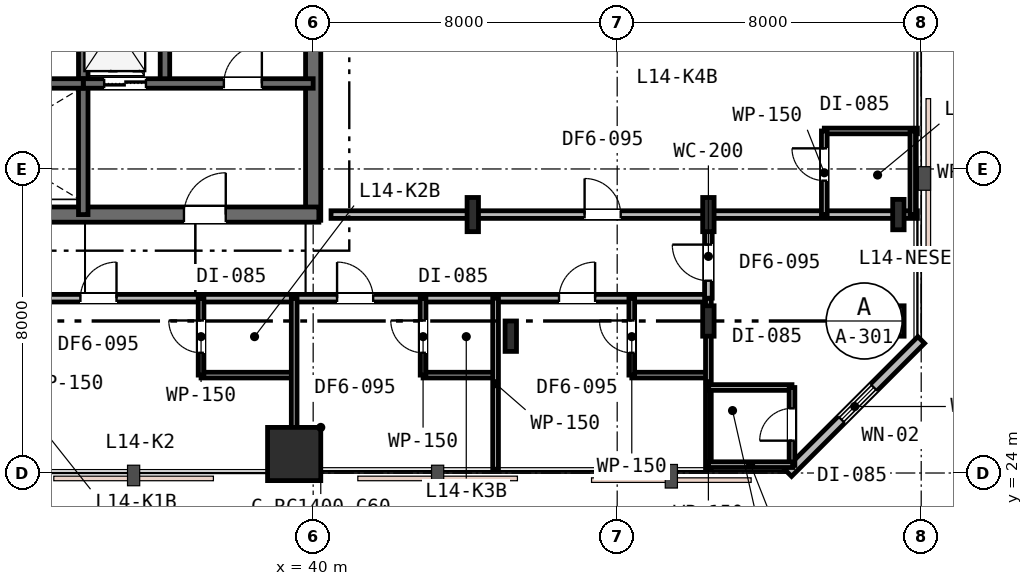
"""IFC4 building model, lengths in metres.
Left out: names, types, materials, properties, quantities, classifications, styles, units other than length and angle.
Written with IfcOpenShell. Run it as: python <this file> out.ifc"""

import sys

from ifc_helpers import new_model, si_unit, direction, frame, frame_2d, origin, origin_2d, place, context, subcontext, project, spatial, rectangle, i_section, extrude, element, fill, save


model = new_model("IFC4")
c1 = context("Model", 3, precision=1e-05, world=origin(), true_north=direction((0.0, 1.0)))
c2 = subcontext(c1, "Body", "Model", "MODEL_VIEW")
j1 = project(units=[si_unit("LENGTHUNIT", "METRE"), si_unit("PLANEANGLEUNIT", "RADIAN")], contexts=[c1])
p1 = place(None, origin())
s1 = spatial("IfcSite", under=j1, at=p1, CompositionType="ELEMENT")
p2 = place(p1, origin())
s2 = spatial("IfcBuilding", under=s1, at=p2, CompositionType="ELEMENT")
p3 = place(p2, frame((0.0, 0.0, 58.2)))
s3 = spatial("IfcBuildingStorey", under=s2, at=p3, CompositionType="ELEMENT", Elevation=58.2)
p4 = place(p3, frame((40.0, 30.65, 0.0), z_axis=(0.0, 0.0, 1.0), x_axis=(0.0, 1.0, 0.0)))
e1 = element("IfcWall", 1, at=p4, inside=s3, PredefinedType="SHEAR", context=c2, shape_type="SweptSolid", body=[
    extrude(rectangle(XDim=12.3, YDim=0.4, at=frame_2d((6.15, 0.0))), origin(), (0.0, 0.0, 1.0), 3.6),
])
p5 = place(p3, frame((28.95, 30.8, 0.0), z_axis=(0.0, 0.0, 1.0), x_axis=(1.0, 0.0, 0.0)))
e2 = element("IfcWall", 2, at=p5, inside=s3, PredefinedType="SHEAR", context=c2, shape_type="SweptSolid", body=[
    extrude(rectangle(XDim=11.2, YDim=0.4, at=frame_2d((5.6, 0.0))), origin(), (0.0, 0.0, 1.0), 3.6),
])
p6 = place(p5, frame((7.65, 0.0, 0.0)))
e3 = element("IfcOpeningElement", 3, at=p6, cuts=e2, PredefinedType="OPENING", context=c2, shape_type="SweptSolid", body=[
    extrude(rectangle(XDim=1.1, YDim=2.15, at=frame_2d((0.55, 1.075))), frame((0.0, 0.21, 0.0), z_axis=(0.0, -1.0, 0.0), x_axis=(1.0, 0.0, 0.0)), (0.0, 0.0, 1.0), 0.42),
])
p7 = place(p3, frame((36.1, 34.25, 0.0), z_axis=(0.0, 0.0, 1.0), x_axis=(0.0, 1.0, 0.0)))
e4 = element("IfcWall", 4, at=p7, inside=s3, PredefinedType="SHEAR", context=c2, shape_type="SweptSolid", body=[
    extrude(rectangle(XDim=8.65, YDim=0.25, at=frame_2d((4.325, 0.0))), origin(), (0.0, 0.0, 1.0), 3.6),
])
p8 = place(p3, frame((33.95, 30.8, 0.0), z_axis=(0.0, 0.0, 1.0), x_axis=(0.0, 1.0, 0.0)))
e5 = element("IfcWall", 5, at=p8, inside=s3, PredefinedType="SHEAR", context=c2, shape_type="SweptSolid", body=[
    extrude(rectangle(XDim=6.45, YDim=0.25, at=frame_2d((3.225, 0.0))), origin(), (0.0, 0.0, 1.0), 3.6),
])
p9 = place(p3, frame((33.95, 34.25, 0.0), z_axis=(0.0, 0.0, 1.0), x_axis=(1.0, 0.0, 0.0)))
e6 = element("IfcWall", 6, at=p9, inside=s3, PredefinedType="SHEAR", context=c2, shape_type="SweptSolid", body=[
    extrude(rectangle(XDim=6.05, YDim=0.25, at=frame_2d((3.025, 0.0))), origin(), (0.0, 0.0, 1.0), 3.6),
])
p10 = place(p9, frame((3.7, 0.0, 0.0)))
e7 = element("IfcOpeningElement", 7, at=p10, cuts=e6, PredefinedType="OPENING", context=c2, shape_type="SweptSolid", body=[
    extrude(rectangle(XDim=1.0, YDim=2.15, at=frame_2d((0.5, 1.075))), frame((0.0, 0.135, 0.0), z_axis=(0.0, -1.0, 0.0), x_axis=(1.0, 0.0, 0.0)), (0.0, 0.0, 1.0), 0.27),
])
p11 = place(p9, frame((0.55, 0.0, 0.0)))
e8 = element("IfcOpeningElement", 8, at=p11, cuts=e6, PredefinedType="OPENING", context=c2, shape_type="SweptSolid", body=[
    extrude(rectangle(XDim=1.1, YDim=2.15, at=frame_2d((0.55, 1.075))), frame((0.0, 0.135, 0.0), z_axis=(0.0, -1.0, 0.0), x_axis=(1.0, 0.0, 0.0)), (0.0, 0.0, 1.0), 0.27),
])
p12 = place(p3, frame((28.95, 34.25, 0.0), z_axis=(0.0, 0.0, 1.0), x_axis=(1.0, 0.0, 0.0)))
e9 = element("IfcWall", 9, at=p12, inside=s3, PredefinedType="SHEAR", context=c2, shape_type="SweptSolid", body=[
    extrude(rectangle(XDim=5.0, YDim=0.25, at=frame_2d((2.5, 0.0))), origin(), (0.0, 0.0, 1.0), 3.6),
])
p13 = place(p3, frame((39.5, 24.5, 0.0), z_axis=(0.0, 0.0, 1.0), x_axis=(1.0, 0.0, 0.0)))
e10 = element("IfcColumn", 10, at=p13, inside=s3, PredefinedType="COLUMN", context=c2, shape_type="SweptSolid", body=[
    extrude(rectangle(XDim=1.4, YDim=1.4, at=origin_2d()), origin(), (0.0, 0.0, 1.0), 3.6),
])
for number, where, z_axis, x_axis in (
    (11, (45.2, 27.6, 0.0), (0.0, 0.0, 1.0), (1.0, 0.0, 0.0)),
    (12, (50.4, 28.0, 0.0), (0.0, 0.0, 1.0), (1.0, 0.0, 0.0)),
    (13, (55.4, 28.0, 0.0), (0.0, 0.0, 1.0), (1.0, 0.0, 0.0)),
    (14, (55.4, 30.8, 0.0), (0.0, 0.0, 1.0), (1.0, 0.0, 0.0)),
):
    element("IfcColumn", number, at=place(p3, frame(where, z_axis=z_axis, x_axis=x_axis)), inside=s3, PredefinedType="COLUMN", context=c2, shape_type="SweptSolid", body=[
        extrude(i_section(OverallWidth=0.3, OverallDepth=0.8, WebThickness=0.018, FlangeThickness=0.033, FilletRadius=0.03, at=origin_2d()), origin(), (0.0, 0.0, 1.0), 3.6),
    ])
for number, where, z_axis, x_axis in (
    (15, (44.2, 30.8, 0.0), (0.0, 0.0, 1.0), (1.0, 0.0, 0.0)),
    (16, (50.4, 30.8, 0.0), (0.0, 0.0, 1.0), (1.0, 0.0, 0.0)),
):
    element("IfcColumn", number, at=place(p3, frame(where, z_axis=z_axis, x_axis=x_axis)), inside=s3, PredefinedType="COLUMN", context=c2, shape_type="SweptSolid", body=[
        extrude(i_section(OverallWidth=0.3, OverallDepth=0.9, WebThickness=0.018, FlangeThickness=0.035, FilletRadius=0.03, at=origin_2d()), origin(), (0.0, 0.0, 1.0), 3.6),
    ])
p14 = place(p3, frame((52.5, 24.0, 0.0), z_axis=(0.0, 0.0, 1.0), x_axis=(0.707106781187, 0.707106781187, 0.0)))
e17 = element("IfcWall", 17, at=p14, inside=s3, PredefinedType="STANDARD", context=c2, shape_type="SweptSolid", body=[
    extrude(rectangle(XDim=4.95, YDim=0.25, at=frame_2d((2.475, 0.0))), origin(), (0.0, 0.0, 1.0), 3.33),
])
p15 = place(p14, frame((1.985, 0.0, 0.85)))
e18 = element("IfcOpeningElement", 18, at=p15, cuts=e17, PredefinedType="OPENING", context=c2, shape_type="SweptSolid", body=[
    extrude(rectangle(XDim=1.2, YDim=1.6, at=frame_2d((0.6, 0.8))), frame((0.0, 0.135, 0.0), z_axis=(0.0, -1.0, 0.0), x_axis=(1.0, 0.0, 0.0)), (0.0, 0.0, 1.0), 0.27),
])
p16 = place(p3, frame((11.8, 28.6, 0.0), z_axis=(0.0, 0.0, 1.0), x_axis=(1.0, 0.0, 0.0)))
e19 = element("IfcWall", 19, at=p16, inside=s3, PredefinedType="PARTITIONING", context=c2, shape_type="SweptSolid", body=[
    extrude(rectangle(XDim=38.6, YDim=0.2, at=frame_2d((19.3, 0.0))), origin(), (0.0, 0.0, 1.0), 2.82),
])
p17 = place(p16, frame((14.3, 0.0, 0.0)))
e20 = element("IfcOpeningElement", 20, at=p17, cuts=e19, PredefinedType="OPENING", context=c2, shape_type="SweptSolid", body=[
    extrude(rectangle(XDim=0.95, YDim=2.15, at=frame_2d((0.475, 1.075))), frame((0.0, 0.11, 0.0), z_axis=(0.0, -1.0, 0.0), x_axis=(1.0, 0.0, 0.0)), (0.0, 0.0, 1.0), 0.22),
])
p18 = place(p16, frame((22.075, 0.0, 0.0)))
e21 = element("IfcOpeningElement", 21, at=p18, cuts=e19, PredefinedType="OPENING", context=c2, shape_type="SweptSolid", body=[
    extrude(rectangle(XDim=0.95, YDim=2.15, at=frame_2d((0.475, 1.075))), frame((0.0, 0.11, 0.0), z_axis=(0.0, -1.0, 0.0), x_axis=(1.0, 0.0, 0.0)), (0.0, 0.0, 1.0), 0.22),
])
p19 = place(p16, frame((28.829, 0.0, 0.0)))
e22 = element("IfcOpeningElement", 22, at=p19, cuts=e19, PredefinedType="OPENING", context=c2, shape_type="SweptSolid", body=[
    extrude(rectangle(XDim=0.95, YDim=2.15, at=frame_2d((0.475, 1.075))), frame((0.0, 0.11, 0.0), z_axis=(0.0, -1.0, 0.0), x_axis=(1.0, 0.0, 0.0)), (0.0, 0.0, 1.0), 0.22),
])
p20 = place(p16, frame((34.669, 0.0, 0.0)))
e23 = element("IfcOpeningElement", 23, at=p20, cuts=e19, PredefinedType="OPENING", context=c2, shape_type="SweptSolid", body=[
    extrude(rectangle(XDim=0.95, YDim=2.15, at=frame_2d((0.475, 1.075))), frame((0.0, 0.11, 0.0), z_axis=(0.0, -1.0, 0.0), x_axis=(1.0, 0.0, 0.0)), (0.0, 0.0, 1.0), 0.22),
])
p21 = place(p3, frame((37.05, 26.576, 0.0), z_axis=(0.0, 0.0, 1.0), x_axis=(1.0, 0.0, 0.0)))
e24 = element("IfcWall", 24, at=p21, inside=s3, PredefinedType="PARTITIONING", context=c2, shape_type="SweptSolid", body=[
    extrude(rectangle(XDim=2.45, YDim=0.15, at=frame_2d((1.225, 0.0))), origin(), (0.0, 0.0, 1.0), 2.82),
])
p22 = place(p3, frame((37.05, 26.576, 0.0), z_axis=(0.0, 0.0, 1.0), x_axis=(0.0, 1.0, 0.0)))
e25 = element("IfcWall", 25, at=p22, inside=s3, PredefinedType="PARTITIONING", context=c2, shape_type="SweptSolid", body=[
    extrude(rectangle(XDim=2.024, YDim=0.15, at=frame_2d((1.012, 0.0))), origin(), (0.0, 0.0, 1.0), 2.96),
])
p23 = place(p22, frame((0.587, 0.0, 0.0)))
e26 = element("IfcOpeningElement", 26, at=p23, cuts=e25, PredefinedType="OPENING", context=c2, shape_type="SweptSolid", body=[
    extrude(rectangle(XDim=0.85, YDim=2.15, at=frame_2d((0.425, 1.075))), frame((0.0, 0.085, 0.0), z_axis=(0.0, -1.0, 0.0), x_axis=(1.0, 0.0, 0.0)), (0.0, 0.0, 1.0), 0.17),
])
p24 = place(p3, frame((39.5, 28.6, 0.0), z_axis=(0.0, 0.0, 1.0), x_axis=(0.0, -1.0, 0.0)))
e27 = element("IfcWall", 27, at=p24, inside=s3, PredefinedType="PARTITIONING", context=c2, shape_type="SweptSolid", body=[
    extrude(rectangle(XDim=4.5, YDim=0.15, at=frame_2d((2.25, 0.0))), origin(), (0.0, 0.0, 1.0), 2.82),
])
p25 = place(p3, frame((42.892, 26.576, 0.0), z_axis=(0.0, 0.0, 1.0), x_axis=(1.0, 0.0, 0.0)))
e28 = element("IfcWall", 28, at=p25, inside=s3, PredefinedType="PARTITIONING", context=c2, shape_type="SweptSolid", body=[
    extrude(rectangle(XDim=1.908, YDim=0.15, at=frame_2d((0.954, 0.0))), origin(), (0.0, 0.0, 1.0), 3.33),
])
p26 = place(p3, frame((42.892, 26.576, 0.0), z_axis=(0.0, 0.0, 1.0), x_axis=(0.0, 1.0, 0.0)))
e29 = element("IfcWall", 29, at=p26, inside=s3, PredefinedType="PARTITIONING", context=c2, shape_type="SweptSolid", body=[
    extrude(rectangle(XDim=2.024, YDim=0.15, at=frame_2d((1.012, 0.0))), origin(), (0.0, 0.0, 1.0), 3.33),
])
p27 = place(p26, frame((0.587, 0.0, 0.0)))
e30 = element("IfcOpeningElement", 30, at=p27, cuts=e29, PredefinedType="OPENING", context=c2, shape_type="SweptSolid", body=[
    extrude(rectangle(XDim=0.85, YDim=2.15, at=frame_2d((0.425, 1.075))), frame((0.0, 0.085, 0.0), z_axis=(0.0, -1.0, 0.0), x_axis=(1.0, 0.0, 0.0)), (0.0, 0.0, 1.0), 0.17),
])
p28 = place(p3, frame((44.8, 28.6, 0.0), z_axis=(0.0, 0.0, 1.0), x_axis=(0.0, -1.0, 0.0)))
e31 = element("IfcWall", 31, at=p28, inside=s3, PredefinedType="PARTITIONING", context=c2, shape_type="SweptSolid", body=[
    extrude(rectangle(XDim=4.5, YDim=0.15, at=frame_2d((2.25, 0.0))), origin(), (0.0, 0.0, 1.0), 2.82),
])
p29 = place(p3, frame((48.384, 26.576, 0.0), z_axis=(0.0, 0.0, 1.0), x_axis=(1.0, 0.0, 0.0)))
e32 = element("IfcWall", 32, at=p29, inside=s3, PredefinedType="PARTITIONING", context=c2, shape_type="SweptSolid", body=[
    extrude(rectangle(XDim=2.016, YDim=0.15, at=frame_2d((1.008, 0.0))), origin(), (0.0, 0.0, 1.0), 3.33),
])
p30 = place(p3, frame((48.384, 26.576, 0.0), z_axis=(0.0, 0.0, 1.0), x_axis=(0.0, 1.0, 0.0)))
e33 = element("IfcWall", 33, at=p30, inside=s3, PredefinedType="PARTITIONING", context=c2, shape_type="SweptSolid", body=[
    extrude(rectangle(XDim=2.024, YDim=0.15, at=frame_2d((1.012, 0.0))), origin(), (0.0, 0.0, 1.0), 3.33),
])
p31 = place(p30, frame((0.587, 0.0, 0.0)))
e34 = element("IfcOpeningElement", 34, at=p31, cuts=e33, PredefinedType="OPENING", context=c2, shape_type="SweptSolid", body=[
    extrude(rectangle(XDim=0.85, YDim=2.15, at=frame_2d((0.425, 1.075))), frame((0.0, 0.085, 0.0), z_axis=(0.0, -1.0, 0.0), x_axis=(1.0, 0.0, 0.0)), (0.0, 0.0, 1.0), 0.17),
])
p32 = place(p3, frame((50.4, 28.6, 0.0), z_axis=(0.0, 0.0, 1.0), x_axis=(0.0, -1.0, 0.0)))
e35 = element("IfcWall", 35, at=p32, inside=s3, PredefinedType="PARTITIONING", context=c2, shape_type="SweptSolid", body=[
    extrude(rectangle(XDim=4.5, YDim=0.15, at=frame_2d((2.25, 0.0))), origin(), (0.0, 0.0, 1.0), 2.82),
])
p33 = place(p3, frame((40.47, 30.8, 0.0), z_axis=(0.0, 0.0, 1.0), x_axis=(1.0, 0.0, 0.0)))
e36 = element("IfcWall", 36, at=p33, inside=s3, PredefinedType="PARTITIONING", context=c2, shape_type="SweptSolid", body=[
    extrude(rectangle(XDim=15.43, YDim=0.2, at=frame_2d((7.715, 0.0))), origin(), (0.0, 0.0, 1.0), 2.82),
])
p34 = place(p33, frame((6.673, 0.0, 0.0)))
e37 = element("IfcOpeningElement", 37, at=p34, cuts=e36, PredefinedType="OPENING", context=c2, shape_type="SweptSolid", body=[
    extrude(rectangle(XDim=0.95, YDim=2.15, at=frame_2d((0.475, 1.075))), frame((0.0, 0.11, 0.0), z_axis=(0.0, -1.0, 0.0), x_axis=(1.0, 0.0, 0.0)), (0.0, 0.0, 1.0), 0.22),
])
p35 = place(p3, frame((53.45, 33.0, 0.0), z_axis=(0.0, 0.0, 1.0), x_axis=(1.0, 0.0, 0.0)))
e38 = element("IfcWall", 38, at=p35, inside=s3, PredefinedType="PARTITIONING", context=c2, shape_type="SweptSolid", body=[
    extrude(rectangle(XDim=2.45, YDim=0.15, at=frame_2d((1.225, 0.0))), origin(), (0.0, 0.0, 1.0), 2.93),
])
p36 = place(p3, frame((53.45, 30.8, 0.0), z_axis=(0.0, 0.0, 1.0), x_axis=(0.0, 1.0, 0.0)))
e39 = element("IfcWall", 39, at=p36, inside=s3, PredefinedType="PARTITIONING", context=c2, shape_type="SweptSolid", body=[
    extrude(rectangle(XDim=2.2, YDim=0.15, at=frame_2d((1.1, 0.0))), origin(), (0.0, 0.0, 1.0), 2.82),
])
p37 = place(p36, frame((0.892, 0.0, 0.0)))
e40 = element("IfcOpeningElement", 40, at=p37, cuts=e39, PredefinedType="OPENING", context=c2, shape_type="SweptSolid", body=[
    extrude(rectangle(XDim=0.85, YDim=2.15, at=frame_2d((0.425, 1.075))), frame((0.0, 0.085, 0.0), z_axis=(0.0, -1.0, 0.0), x_axis=(1.0, 0.0, 0.0)), (0.0, 0.0, 1.0), 0.17),
])
p38 = place(p3, frame((55.78, 33.0, 0.0), z_axis=(0.0, 0.0, 1.0), x_axis=(0.0, -1.0, 0.0)))
e41 = element("IfcWall", 41, at=p38, inside=s3, PredefinedType="PARTITIONING", context=c2, shape_type="SweptSolid", body=[
    extrude(rectangle(XDim=2.2, YDim=0.15, at=frame_2d((1.1, 0.0))), origin(), (0.0, 0.0, 1.0), 2.82),
])
p39 = place(p3, frame((50.4, 28.6, 0.0), z_axis=(0.0, 0.0, 1.0), x_axis=(0.0, 1.0, 0.0)))
e42 = element("IfcWall", 42, at=p39, inside=s3, PredefinedType="PARTITIONING", context=c2, shape_type="SweptSolid", body=[
    extrude(rectangle(XDim=2.2, YDim=0.2, at=frame_2d((1.1, 0.0))), origin(), (0.0, 0.0, 1.0), 2.82),
])
p40 = place(p39, frame((0.46, 0.0, 0.0)))
e43 = element("IfcOpeningElement", 43, at=p40, cuts=e42, PredefinedType="OPENING", context=c2, shape_type="SweptSolid", body=[
    extrude(rectangle(XDim=0.95, YDim=2.15, at=frame_2d((0.475, 1.075))), frame((0.0, 0.11, 0.0), z_axis=(0.0, -1.0, 0.0), x_axis=(1.0, 0.0, 0.0)), (0.0, 0.0, 1.0), 0.22),
])
p41 = place(p3, frame((50.4, 26.25, 0.0), z_axis=(0.0, 0.0, 1.0), x_axis=(1.0, 0.0, 0.0)))
e44 = element("IfcWall", 44, at=p41, inside=s3, PredefinedType="PARTITIONING", context=c2, shape_type="SweptSolid", body=[
    extrude(rectangle(XDim=2.2, YDim=0.15, at=frame_2d((1.1, 0.0))), origin(), (0.0, 0.0, 1.0), 3.33),
])
p42 = place(p3, frame((52.6, 24.2, 0.0), z_axis=(0.0, 0.0, 1.0), x_axis=(0.0, 1.0, 0.0)))
e45 = element("IfcWall", 45, at=p42, inside=s3, PredefinedType="PARTITIONING", context=c2, shape_type="SweptSolid", body=[
    extrude(rectangle(XDim=2.05, YDim=0.15, at=frame_2d((1.025, 0.0))), origin(), (0.0, 0.0, 1.0), 3.33),
])
p43 = place(p42, frame((0.651, 0.0, 0.0)))
e46 = element("IfcOpeningElement", 46, at=p43, cuts=e45, PredefinedType="OPENING", context=c2, shape_type="SweptSolid", body=[
    extrude(rectangle(XDim=0.85, YDim=2.15, at=frame_2d((0.425, 1.075))), frame((0.0, 0.085, 0.0), z_axis=(0.0, -1.0, 0.0), x_axis=(1.0, 0.0, 0.0)), (0.0, 0.0, 1.0), 0.17),
])
p44 = place(p3, frame((52.62, 24.22, 0.0), z_axis=(0.0, 0.0, 1.0), x_axis=(-1.0, 0.0, 0.0)))
e47 = element("IfcWall", 47, at=p44, inside=s3, PredefinedType="PARTITIONING", context=c2, shape_type="SweptSolid", body=[
    extrude(rectangle(XDim=2.22, YDim=0.15, at=frame_2d((1.11, 0.0))), origin(), (0.0, 0.0, 1.0), 3.33),
])
p45 = place(p15, origin())
e48 = element("IfcWindow", 48, at=p45, inside=s3, PartitioningType="SINGLE_PANEL", PredefinedType="WINDOW", context=c2, shape_type="SweptSolid", body=[
    extrude(rectangle(XDim=1.2, YDim=1.6, at=frame_2d((0.6, 0.8))), frame((0.0, 0.03, 0.0), z_axis=(0.0, -1.0, 0.0), x_axis=(1.0, 0.0, 0.0)), (0.0, 0.0, 1.0), 0.06),
])
fill(e18, e48)
p46 = place(p10, origin())
e49 = element("IfcDoor", 49, at=p46, inside=s3, OperationType="SINGLE_SWING_RIGHT", PredefinedType="DOOR", context=c2, shape_type="SweptSolid", body=[
    extrude(rectangle(XDim=1.0, YDim=2.15, at=frame_2d((0.5, 1.075))), frame((0.0, 0.025, 0.0), z_axis=(0.0, -1.0, 0.0), x_axis=(1.0, 0.0, 0.0)), (0.0, 0.0, 1.0), 0.05),
])
fill(e7, e49)
p47 = place(p6, origin())
e50 = element("IfcDoor", 50, at=p47, inside=s3, OperationType="SINGLE_SWING_RIGHT", PredefinedType="DOOR", context=c2, shape_type="SweptSolid", body=[
    extrude(rectangle(XDim=1.1, YDim=2.15, at=frame_2d((0.55, 1.075))), frame((0.0, 0.025, 0.0), z_axis=(0.0, -1.0, 0.0), x_axis=(1.0, 0.0, 0.0)), (0.0, 0.0, 1.0), 0.05),
])
fill(e3, e50)
p48 = place(p18, origin())
e51 = element("IfcDoor", 51, at=p48, inside=s3, OperationType="SINGLE_SWING_RIGHT", PredefinedType="DOOR", context=c2, shape_type="SweptSolid", body=[
    extrude(rectangle(XDim=0.95, YDim=2.15, at=frame_2d((0.475, 1.075))), frame((0.0, 0.025, 0.0), z_axis=(0.0, -1.0, 0.0), x_axis=(1.0, 0.0, 0.0)), (0.0, 0.0, 1.0), 0.05),
])
fill(e21, e51)
p49 = place(p23, origin())
e52 = element("IfcDoor", 52, at=p49, inside=s3, OperationType="SINGLE_SWING_RIGHT", PredefinedType="DOOR", context=c2, shape_type="SweptSolid", body=[
    extrude(rectangle(XDim=0.85, YDim=2.15, at=frame_2d((0.425, 1.075))), frame((0.0, 0.025, 0.0), z_axis=(0.0, -1.0, 0.0), x_axis=(1.0, 0.0, 0.0)), (0.0, 0.0, 1.0), 0.05),
])
fill(e26, e52)
p50 = place(p19, origin())
e53 = element("IfcDoor", 53, at=p50, inside=s3, OperationType="SINGLE_SWING_LEFT", PredefinedType="DOOR", context=c2, shape_type="SweptSolid", body=[
    extrude(rectangle(XDim=0.95, YDim=2.15, at=frame_2d((0.475, 1.075))), frame((0.0, 0.025, 0.0), z_axis=(0.0, -1.0, 0.0), x_axis=(1.0, 0.0, 0.0)), (0.0, 0.0, 1.0), 0.05),
])
fill(e22, e53)
p51 = place(p27, origin())
e54 = element("IfcDoor", 54, at=p51, inside=s3, OperationType="SINGLE_SWING_RIGHT", PredefinedType="DOOR", context=c2, shape_type="SweptSolid", body=[
    extrude(rectangle(XDim=0.85, YDim=2.15, at=frame_2d((0.425, 1.075))), frame((0.0, 0.025, 0.0), z_axis=(0.0, -1.0, 0.0), x_axis=(1.0, 0.0, 0.0)), (0.0, 0.0, 1.0), 0.05),
])
fill(e30, e54)
p52 = place(p20, origin())
e55 = element("IfcDoor", 55, at=p52, inside=s3, OperationType="SINGLE_SWING_RIGHT", PredefinedType="DOOR", context=c2, shape_type="SweptSolid", body=[
    extrude(rectangle(XDim=0.95, YDim=2.15, at=frame_2d((0.475, 1.075))), frame((0.0, 0.025, 0.0), z_axis=(0.0, -1.0, 0.0), x_axis=(1.0, 0.0, 0.0)), (0.0, 0.0, 1.0), 0.05),
])
fill(e23, e55)
p53 = place(p31, origin())
e56 = element("IfcDoor", 56, at=p53, inside=s3, OperationType="SINGLE_SWING_RIGHT", PredefinedType="DOOR", context=c2, shape_type="SweptSolid", body=[
    extrude(rectangle(XDim=0.85, YDim=2.15, at=frame_2d((0.425, 1.075))), frame((0.0, 0.025, 0.0), z_axis=(0.0, -1.0, 0.0), x_axis=(1.0, 0.0, 0.0)), (0.0, 0.0, 1.0), 0.05),
])
fill(e34, e56)
p54 = place(p34, origin())
e57 = element("IfcDoor", 57, at=p54, inside=s3, OperationType="SINGLE_SWING_LEFT", PredefinedType="DOOR", context=c2, shape_type="SweptSolid", body=[
    extrude(rectangle(XDim=0.95, YDim=2.15, at=frame_2d((0.475, 1.075))), frame((0.0, 0.025, 0.0), z_axis=(0.0, -1.0, 0.0), x_axis=(1.0, 0.0, 0.0)), (0.0, 0.0, 1.0), 0.05),
])
fill(e37, e57)
p55 = place(p37, origin())
e58 = element("IfcDoor", 58, at=p55, inside=s3, OperationType="SINGLE_SWING_RIGHT", PredefinedType="DOOR", context=c2, shape_type="SweptSolid", body=[
    extrude(rectangle(XDim=0.85, YDim=2.15, at=frame_2d((0.425, 1.075))), frame((0.0, 0.025, 0.0), z_axis=(0.0, -1.0, 0.0), x_axis=(1.0, 0.0, 0.0)), (0.0, 0.0, 1.0), 0.05),
])
fill(e40, e58)
p56 = place(p40, origin())
e59 = element("IfcDoor", 59, at=p56, inside=s3, OperationType="SINGLE_SWING_RIGHT", PredefinedType="DOOR", context=c2, shape_type="SweptSolid", body=[
    extrude(rectangle(XDim=0.95, YDim=2.15, at=frame_2d((0.475, 1.075))), frame((0.0, 0.025, 0.0), z_axis=(0.0, -1.0, 0.0), x_axis=(1.0, 0.0, 0.0)), (0.0, 0.0, 1.0), 0.05),
])
fill(e43, e59)
p57 = place(p43, origin())
e60 = element("IfcDoor", 60, at=p57, inside=s3, OperationType="SINGLE_SWING_LEFT", PredefinedType="DOOR", context=c2, shape_type="SweptSolid", body=[
    extrude(rectangle(XDim=0.85, YDim=2.15, at=frame_2d((0.425, 1.075))), frame((0.0, 0.025, 0.0), z_axis=(0.0, -1.0, 0.0), x_axis=(1.0, 0.0, 0.0)), (0.0, 0.0, 1.0), 0.05),
])
fill(e46, e60)
p58 = place(p11, origin())
e61 = element("IfcDoor", 61, at=p58, inside=s3, OperationType="DOUBLE_DOOR_SLIDING", PredefinedType="DOOR", context=c2, shape_type="SweptSolid", body=[
    extrude(rectangle(XDim=1.1, YDim=2.15, at=frame_2d((0.55, 1.075))), frame((0.0, 0.025, 0.0), z_axis=(0.0, -1.0, 0.0), x_axis=(1.0, 0.0, 0.0)), (0.0, 0.0, 1.0), 0.05),
])
fill(e8, e61)
save(model, sys.argv[1])
